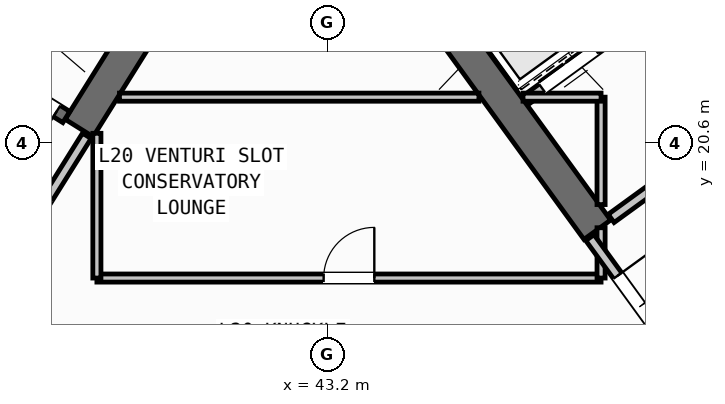
"""IFC4 building model, lengths in metres.
Left out: names, types, materials, properties, quantities, classifications, styles, units other than length and angle.
Written with IfcOpenShell. Run it as: python <this file> out.ifc"""

import sys

from ifc_helpers import new_model, si_unit, direction, frame, frame_2d, origin, place, context, subcontext, project, spatial, rectangle, extrude, source, transform, mapped, element, fill, save


model = new_model("IFC4")
c1 = context("Model", 3, precision=1e-05, world=origin(), true_north=direction((0.0, 1.0)))
c2 = subcontext(c1, "Body", "Model", "MODEL_VIEW")
j1 = project(units=[si_unit("LENGTHUNIT", "METRE"), si_unit("PLANEANGLEUNIT", "RADIAN")], contexts=[c1])
p1 = place(None, origin())
s1 = spatial("IfcSite", under=j1, at=p1, CompositionType="ELEMENT")
p2 = place(p1, origin())
s2 = spatial("IfcBuilding", under=s1, at=p2, CompositionType="ELEMENT")
p3 = place(p2, frame((0.0, 0.0, 81.0)))
s3 = spatial("IfcBuildingStorey", under=s2, at=p3, CompositionType="ELEMENT", Elevation=81.0)
p4 = place(p3, frame((40.168, 23.88, 0.0), z_axis=(0.0, 0.0, 1.0), x_axis=(-0.529893103397, -0.8480644427, 0.0)))
e1 = element("IfcWall", 1, at=p4, inside=s3, PredefinedType="SHEAR", context=c2, shape_type="SweptSolid", body=[
    extrude(rectangle(XDim=3.525, YDim=0.65, at=frame_2d((1.763, 0.0))), origin(), (0.0, 0.0, 1.0), 3.32),
])
p5 = place(p3, frame((48.526, 18.884, 0.0), z_axis=(0.0, 0.0, 1.0), x_axis=(-0.58777996584, 0.809020835181, 0.0)))
e2 = element("IfcWall", 2, at=p5, inside=s3, PredefinedType="SHEAR", context=c2, shape_type="SweptSolid", body=[
    extrude(rectangle(XDim=6.375, YDim=0.65, at=frame_2d((3.188, 0.0))), origin(), (0.0, 0.0, 1.0), 3.32),
])
p6 = place(p3, frame((38.046, 21.108, 0.0), z_axis=(0.0, 0.0, 1.0), x_axis=(-0.848054434086, 0.529909121291, 0.0)))
e3 = element("IfcWall", 3, at=p6, inside=s3, PredefinedType="SHEAR", context=c2, shape_type="SweptSolid", body=[
    extrude(rectangle(XDim=7.33, YDim=0.26, at=frame_2d((3.665, 0.0))), origin(), (0.0, 0.0, 1.0), 3.32),
])
p7 = place(p6, frame((0.22, 0.0, 0.0)))
e4 = element("IfcOpeningElement", 4, at=p7, cuts=e3, PredefinedType="OPENING", context=c2, shape_type="SweptSolid", body=[
    extrude(rectangle(XDim=1.1, YDim=2.1, at=frame_2d((0.55, 1.05))), frame((0.0, 0.14, 0.0), z_axis=(0.0, -1.0, 0.0), x_axis=(1.0, 0.0, 0.0)), (0.0, 0.0, 1.0), 0.28),
])
p8 = place(p3, frame((47.106, 21.437, 0.0), z_axis=(0.0, 0.0, 1.0), x_axis=(0.809012514015, 0.58779141893, 0.0)))
e5 = element("IfcWall", 5, at=p8, inside=s3, PredefinedType="STANDARD", context=c2, shape_type="SweptSolid", body=[
    extrude(rectangle(XDim=3.398, YDim=0.2, at=frame_2d((1.699, 0.0))), origin(), (0.0, 0.0, 1.0), 3.31),
])
p9 = place(p8, frame((0.408, 0.0, 0.0)))
e6 = element("IfcOpeningElement", 6, at=p9, cuts=e5, PredefinedType="OPENING", context=c2, shape_type="SweptSolid", body=[
    extrude(rectangle(XDim=1.3, YDim=2.2, at=frame_2d((0.65, 1.1))), frame((0.0, 0.11, 0.0), z_axis=(0.0, -1.0, 0.0), x_axis=(1.0, 0.0, 0.0)), (0.0, 0.0, 1.0), 0.22),
])
p10 = place(p3, frame((48.799, 19.107, 0.0), z_axis=(0.0, 0.0, 1.0), x_axis=(0.809012959416, 0.587790805897, 0.0)))
e7 = element("IfcWall", 7, at=p10, inside=s3, PredefinedType="STANDARD", context=c2, shape_type="SweptSolid", body=[
    extrude(rectangle(XDim=5.718, YDim=0.2, at=frame_2d((2.859, 0.0))), origin(), (0.0, 0.0, 1.0), 3.31),
])
p11 = place(p10, frame((2.498, 0.0, 0.0)))
e8 = element("IfcOpeningElement", 8, at=p11, cuts=e7, PredefinedType="OPENING", context=c2, shape_type="SweptSolid", body=[
    extrude(rectangle(XDim=1.15, YDim=2.1, at=frame_2d((0.575, 1.05))), frame((0.0, 0.11, 0.0), z_axis=(0.0, -1.0, 0.0), x_axis=(1.0, 0.0, 0.0)), (0.0, 0.0, 1.0), 0.22),
])
p12 = place(p3, frame((38.451, 20.737, 0.0), z_axis=(0.0, 0.0, 1.0), x_axis=(-0.529924799939, -0.848044637038, 0.0)))
e9 = element("IfcWall", 9, at=p12, inside=s3, PredefinedType="STANDARD", context=c2, shape_type="SweptSolid", body=[
    extrude(rectangle(XDim=2.96, YDim=0.2, at=frame_2d((1.48, 0.0))), origin(), (0.0, 0.0, 1.0), 3.31),
])
p13 = place(p12, frame((1.46, 0.0, 0.0)))
e10 = element("IfcOpeningElement", 10, at=p13, cuts=e9, PredefinedType="OPENING", context=c2, shape_type="SweptSolid", body=[
    extrude(rectangle(XDim=0.86, YDim=2.05, at=frame_2d((0.43, 1.025))), frame((0.0, 0.11, 0.0), z_axis=(0.0, -1.0, 0.0), x_axis=(1.0, 0.0, 0.0)), (0.0, 0.0, 1.0), 0.22),
])
p14 = place(p3, frame((38.65, 17.93, 0.0), z_axis=(0.0, 0.0, 1.0), x_axis=(1.0, 0.0, 0.0)))
e11 = element("IfcWall", 11, at=p14, inside=s3, PredefinedType="PARTITIONING", context=c2, shape_type="SweptSolid", body=[
    extrude(rectangle(XDim=9.95, YDim=0.16, at=frame_2d((4.975, 0.0))), origin(), (0.0, 0.0, 1.0), 3.31),
])
p15 = place(p14, frame((4.475, 0.0, 0.0)))
e12 = element("IfcOpeningElement", 12, at=p15, cuts=e11, PredefinedType="OPENING", context=c2, shape_type="SweptSolid", body=[
    extrude(rectangle(XDim=1.0, YDim=2.1, at=frame_2d((0.5, 1.05))), frame((0.0, 0.09, 0.0), z_axis=(0.0, -1.0, 0.0), x_axis=(1.0, 0.0, 0.0)), (0.0, 0.0, 1.0), 0.18),
])
p16 = place(p3, frame((38.65, 17.93, 0.0), z_axis=(0.0, 0.0, 1.0), x_axis=(0.0, 1.0, 0.0)))
e13 = element("IfcWall", 13, at=p16, inside=s3, PredefinedType="PARTITIONING", context=c2, shape_type="SweptSolid", body=[
    extrude(rectangle(XDim=2.857, YDim=0.16, at=frame_2d((1.428, 0.0))), origin(), (0.0, 0.0, 1.0), 3.31),
])
p17 = place(p3, frame((48.6, 17.93, 0.0), z_axis=(0.0, 0.0, 1.0), x_axis=(0.0, 1.0, 0.0)))
e14 = element("IfcWall", 14, at=p17, inside=s3, PredefinedType="PARTITIONING", context=c2, shape_type="SweptSolid", body=[
    extrude(rectangle(XDim=0.993, YDim=0.16, at=frame_2d((0.496, 0.0))), origin(), (0.0, 0.0, 1.0), 3.31),
])
p18 = place(p3, frame((48.6, 19.38, 0.0), z_axis=(0.0, 0.0, 1.0), x_axis=(0.0, 1.0, 0.0)))
e15 = element("IfcWall", 15, at=p18, inside=s3, PredefinedType="PARTITIONING", context=c2, shape_type="SweptSolid", body=[
    extrude(rectangle(XDim=2.12, YDim=0.16, at=frame_2d((1.06, 0.0))), origin(), (0.0, 0.0, 1.0), 3.31),
])
p19 = place(p3, frame((39.095, 21.5, 0.0), z_axis=(0.0, 0.0, 1.0), x_axis=(1.0, 0.0, 0.0)))
e16 = element("IfcWall", 16, at=p19, inside=s3, PredefinedType="PARTITIONING", context=c2, shape_type="SweptSolid", body=[
    extrude(rectangle(XDim=7.094, YDim=0.16, at=frame_2d((3.547, 0.0))), origin(), (0.0, 0.0, 1.0), 3.31),
])
p20 = place(p3, frame((47.06, 21.5, 0.0), z_axis=(0.0, 0.0, 1.0), x_axis=(1.0, 0.0, 0.0)))
e17 = element("IfcWall", 17, at=p20, inside=s3, PredefinedType="PARTITIONING", context=c2, shape_type="SweptSolid", body=[
    extrude(rectangle(XDim=1.54, YDim=0.16, at=frame_2d((0.77, 0.0))), origin(), (0.0, 0.0, 1.0), 3.31),
])
p21 = place(p3, frame((50.119, 16.333, 0.0), z_axis=(0.0, 0.0, 1.0), x_axis=(-0.587749856981, 0.809042709391, 0.0)))
e18 = element("IfcWall", 18, at=p21, inside=s3, PredefinedType="STANDARD", context=c2, shape_type="SweptSolid", body=[
    extrude(rectangle(XDim=2.96, YDim=0.2, at=frame_2d((1.48, 0.0))), origin(), (0.0, 0.0, 1.0), 3.31),
])
p22 = place(p21, frame((0.53, 0.0, 0.0)))
e19 = element("IfcOpeningElement", 19, at=p22, cuts=e18, PredefinedType="OPENING", context=c2, shape_type="SweptSolid", body=[
    extrude(rectangle(XDim=1.5, YDim=2.15, at=frame_2d((0.75, 1.075))), frame((0.0, 0.11, 0.0), z_axis=(0.0, -1.0, 0.0), x_axis=(1.0, 0.0, 0.0)), (0.0, 0.0, 1.0), 0.22),
])
m1 = source(origin(), c2, "Body", "SweptSolid", [
    extrude(rectangle(XDim=1.1, YDim=2.1, at=frame_2d((0.55, 1.05))), frame((0.0, 0.025, 0.0), z_axis=(0.0, -1.0, 0.0), x_axis=(1.0, 0.0, 0.0)), (0.0, 0.0, 1.0), 0.05),
])
p23 = place(p7, origin())
e20 = element("IfcDoor", 20, at=p23, inside=s3, OperationType="SINGLE_SWING_LEFT", PredefinedType="DOOR", context=c2, shape_type="MappedRepresentation", body=[
    mapped(m1, transform((0.0, 0.0, 0.0), scale=1.0)),
])
fill(e4, e20)
m2 = source(origin(), c2, "Body", "SweptSolid", [
    extrude(rectangle(XDim=1.3, YDim=2.2, at=frame_2d((0.65, 1.1))), frame((0.0, 0.025, 0.0), z_axis=(0.0, -1.0, 0.0), x_axis=(1.0, 0.0, 0.0)), (0.0, 0.0, 1.0), 0.05),
])
p24 = place(p9, origin())
e21 = element("IfcDoor", 21, at=p24, inside=s3, OperationType="DOUBLE_DOOR_SLIDING", PredefinedType="DOOR", context=c2, shape_type="MappedRepresentation", body=[
    mapped(m2, transform((0.0, 0.0, 0.0), scale=1.0)),
])
fill(e6, e21)
m3 = source(origin(), c2, "Body", "SweptSolid", [
    extrude(rectangle(XDim=1.0, YDim=2.1, at=frame_2d((0.5, 1.05))), frame((0.0, 0.025, 0.0), z_axis=(0.0, -1.0, 0.0), x_axis=(1.0, 0.0, 0.0)), (0.0, 0.0, 1.0), 0.05),
])
p25 = place(p15, origin())
e22 = element("IfcDoor", 22, at=p25, inside=s3, OperationType="SINGLE_SWING_RIGHT", PredefinedType="DOOR", context=c2, shape_type="MappedRepresentation", body=[
    mapped(m3, transform((0.0, 0.0, 0.0), scale=1.0)),
])
fill(e12, e22)
m4 = source(origin(), c2, "Body", "SweptSolid", [
    extrude(rectangle(XDim=1.5, YDim=2.15, at=frame_2d((0.75, 1.075))), frame((0.0, 0.025, 0.0), z_axis=(0.0, -1.0, 0.0), x_axis=(1.0, 0.0, 0.0)), (0.0, 0.0, 1.0), 0.05),
])
p26 = place(p22, frame((1.5, 0.0, 0.0), z_axis=(0.0, 0.0, 1.0), x_axis=(-1.0, 0.0, 0.0)))
e23 = element("IfcDoor", 23, at=p26, inside=s3, OperationType="DOUBLE_DOOR_SINGLE_SWING", PredefinedType="DOOR", context=c2, shape_type="MappedRepresentation", body=[
    mapped(m4, transform((0.0, 0.0, 0.0), scale=1.0)),
])
fill(e19, e23)
save(model, sys.argv[1])
